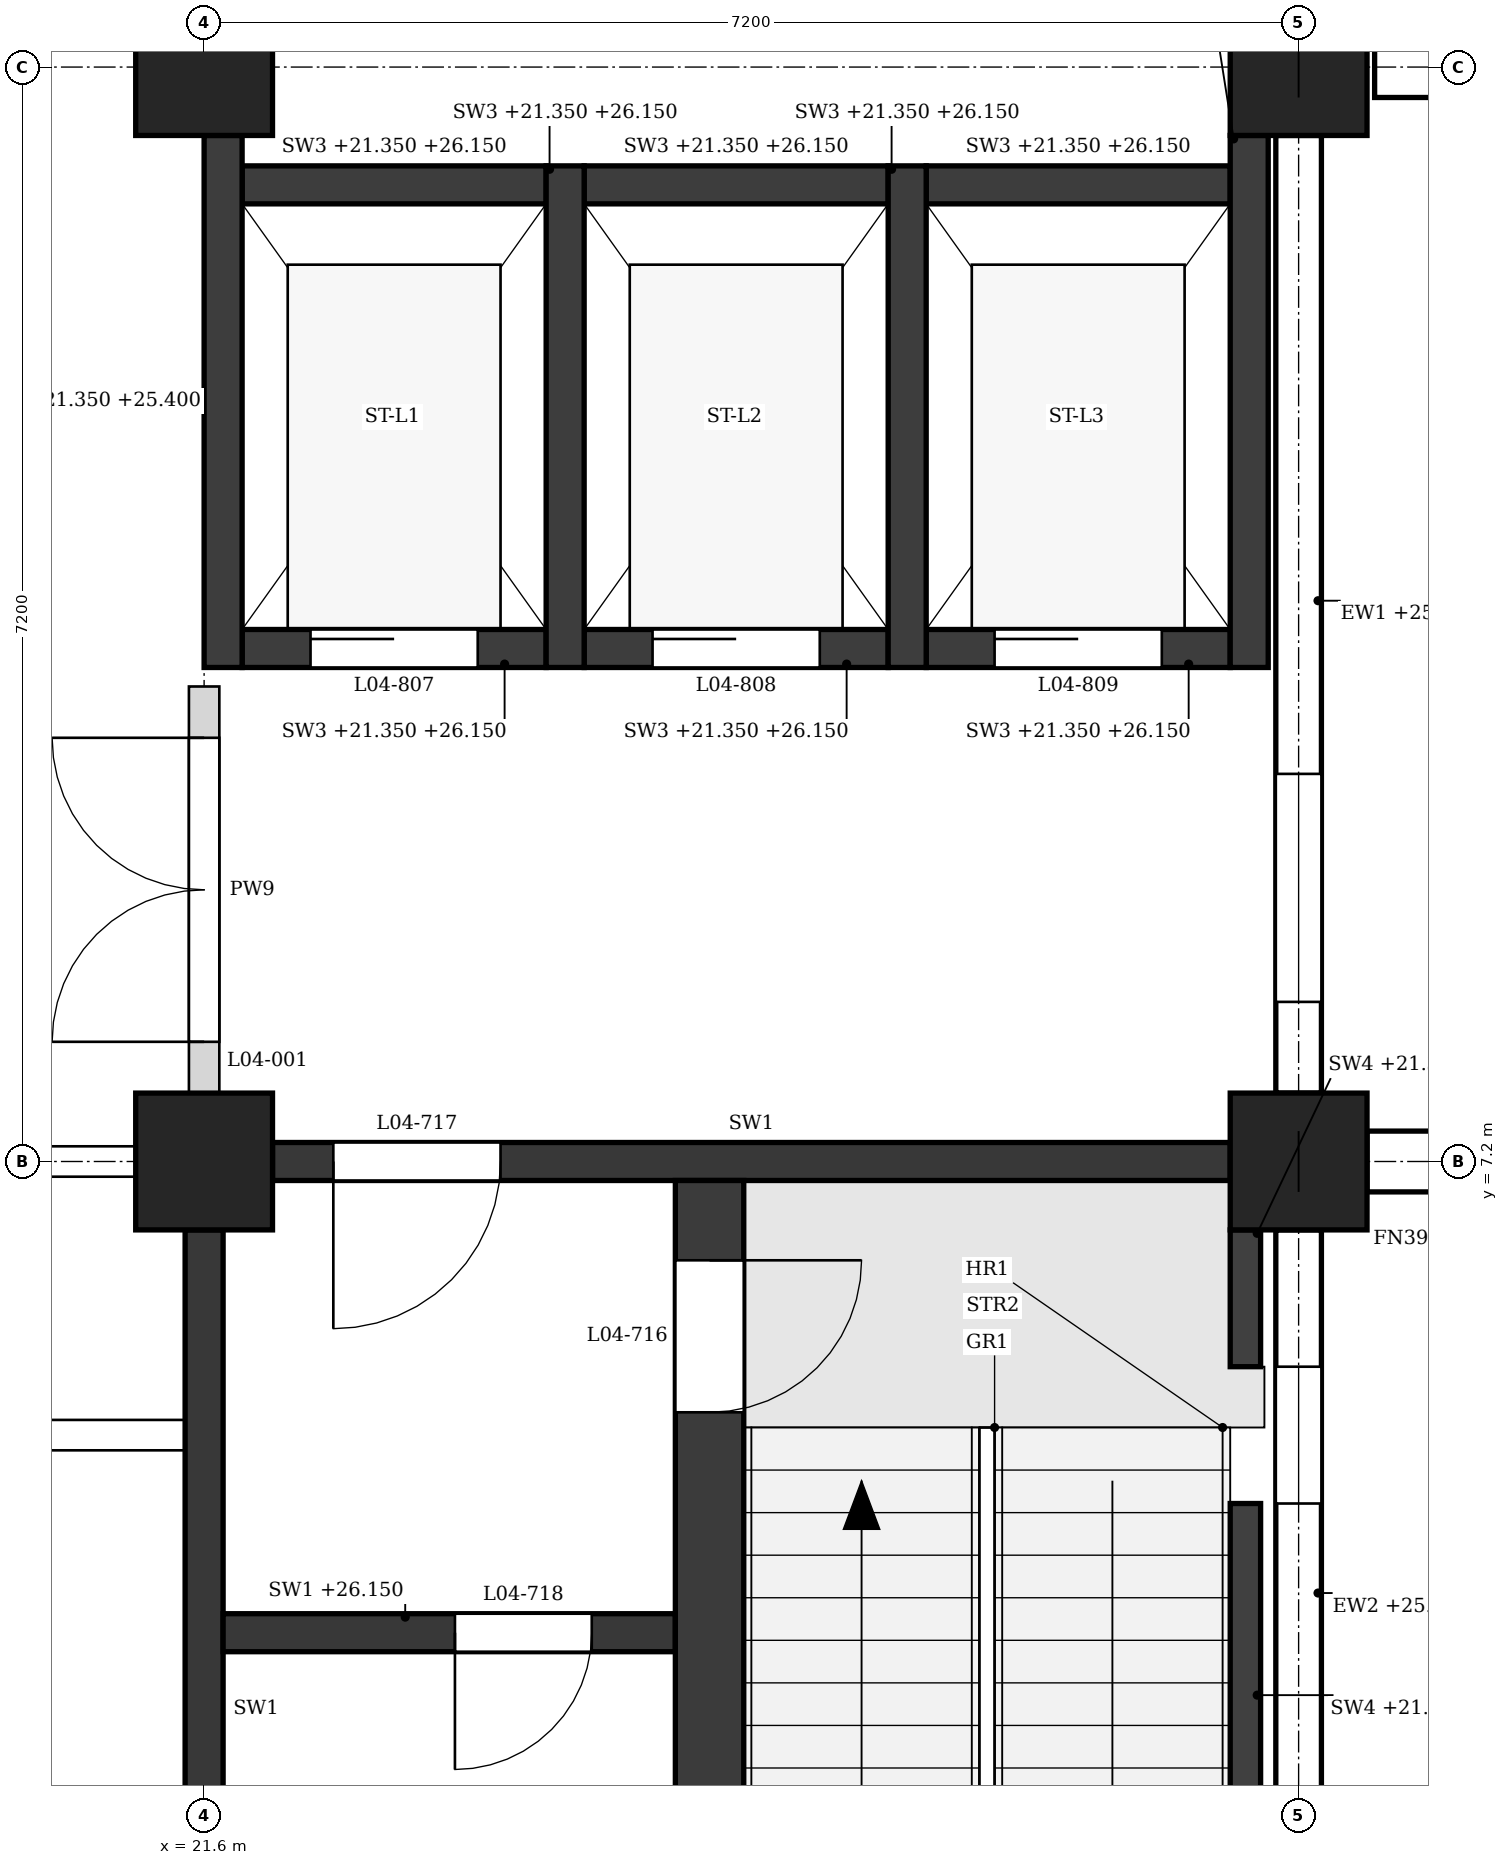
"""IFC4 building model, lengths in metres.
Left out: names, types, materials, properties, quantities, classifications, styles, units other than length and angle.
Written with IfcOpenShell. Run it as: python <this file> out.ifc"""

import sys

from ifc_helpers import new_model, si_unit, direction, frame, frame_2d, origin, origin_2d, place, context, subcontext, project, spatial, polyline, rectangle, outline, extrude, element, fill, save


model = new_model("IFC4")
c1 = context("Model", 3, precision=1e-05, world=origin(), true_north=direction((0.0, 1.0)))
c2 = subcontext(c1, "Body", "Model", "MODEL_VIEW")
j1 = project(units=[si_unit("LENGTHUNIT", "METRE"), si_unit("PLANEANGLEUNIT", "RADIAN")], contexts=[c1])
p1 = place(None, origin())
s1 = spatial("IfcSite", under=j1, at=p1, CompositionType="ELEMENT")
p2 = place(p1, origin())
s2 = spatial("IfcBuilding", under=s1, at=p2, CompositionType="ELEMENT")
p3 = place(p2, frame((0.0, 0.0, 21.6)))
s3 = spatial("IfcBuildingStorey", under=s2, at=p3, CompositionType="ELEMENT", Elevation=21.6)
for number, where, z_axis, x_axis in (
    (1, (21.6, 7.2, 0.0), (0.0, 0.0, 1.0), (1.0, 0.0, 0.0)),
    (2, (21.6, 14.4, 0.0), (0.0, 0.0, 1.0), (1.0, 0.0, 0.0)),
    (3, (28.8, 7.2, 0.0), (0.0, 0.0, 1.0), (1.0, 0.0, 0.0)),
    (4, (28.8, 14.4, 0.0), (0.0, 0.0, 1.0), (1.0, 0.0, 0.0)),
):
    element("IfcColumn", number, at=place(p3, frame(where, z_axis=z_axis, x_axis=x_axis)), inside=s3, PredefinedType="COLUMN", context=c2, shape_type="SweptSolid", body=[
        extrude(rectangle(XDim=0.9, YDim=0.9, at=origin_2d()), origin(), (0.0, 0.0, 1.0), 4.8),
    ])
p4 = place(p3, frame((28.8, 0.45, 0.0), z_axis=(0.0, 0.0, 1.0), x_axis=(0.0, 1.0, 0.0)))
e5 = element("IfcWall", 5, at=p4, inside=s3, PredefinedType="STANDARD", context=c2, shape_type="SweptSolid", body=[
    extrude(rectangle(XDim=6.3, YDim=0.3, at=frame_2d((3.15, 0.0))), origin(), (0.0, 0.0, 1.0), 3.95),
])
p5 = place(p4, frame((0.9, 0.0, 0.9)))
e6 = element("IfcOpeningElement", 6, at=p5, cuts=e5, PredefinedType="OPENING", context=c2, shape_type="SweptSolid", body=[
    extrude(outline(polyline([(0.0, 0.0), (0.9, 0.0), (0.9, 2.05), (0.45, 2.5), (0.0, 2.05), (0.0, 0.0)])), frame((0.0, 0.16, 0.0), z_axis=(0.0, -1.0, 0.0), x_axis=(1.0, 0.0, 0.0)), (0.0, 0.0, 1.0), 0.32),
])
p6 = place(p4, frame((4.5, 0.0, 0.9)))
e7 = element("IfcOpeningElement", 7, at=p6, cuts=e5, PredefinedType="OPENING", context=c2, shape_type="SweptSolid", body=[
    extrude(outline(polyline([(0.0, 0.0), (0.9, 0.0), (0.9, 2.05), (0.45, 2.5), (0.0, 2.05), (0.0, 0.0)])), frame((0.0, 0.16, 0.0), z_axis=(0.0, -1.0, 0.0), x_axis=(1.0, 0.0, 0.0)), (0.0, 0.0, 1.0), 0.32),
])
p7 = place(p3, frame((28.8, 7.65, 0.0), z_axis=(0.0, 0.0, 1.0), x_axis=(0.0, 1.0, 0.0)))
e8 = element("IfcWall", 8, at=p7, inside=s3, PredefinedType="STANDARD", context=c2, shape_type="SweptSolid", body=[
    extrude(rectangle(XDim=6.3, YDim=0.3, at=frame_2d((3.15, 0.0))), origin(), (0.0, 0.0, 1.0), 3.95),
])
p8 = place(p7, frame((0.6, 0.0, 0.9)))
e9 = element("IfcOpeningElement", 9, at=p8, cuts=e8, PredefinedType="OPENING", context=c2, shape_type="SweptSolid", body=[
    extrude(outline(polyline([(0.0, 0.0), (1.5, 0.0), (1.5, 1.75), (0.75, 2.5), (0.0, 1.75), (0.0, 0.0)])), frame((0.0, 0.16, 0.0), z_axis=(0.0, -1.0, 0.0), x_axis=(1.0, 0.0, 0.0)), (0.0, 0.0, 1.0), 0.32),
])
for number, where, z_axis, x_axis in (
    (10, (29.25, 7.2, -0.25), (0.0, 0.0, 1.0), (1.0, 0.0, 0.0)),
    (11, (29.3, 14.4, -0.25), (0.0, 0.0, 1.0), (1.0, 0.0, 0.0)),
):
    element("IfcWall", number, at=place(p3, frame(where, z_axis=z_axis, x_axis=x_axis)), inside=s3, PredefinedType="POLYGONAL", context=c2, shape_type="SweptSolid", body=[
        extrude(outline(polyline([(0.6, 0.0), (0.6, 19.125), (0.55, 19.2), (0.0, 19.2), (0.0, 0.0), (0.6, 0.0)])), frame((0.0, 0.2, 0.0), z_axis=(0.0, -1.0, 0.0), x_axis=(1.0, 0.0, 0.0)), (0.0, 0.0, 1.0), 0.4),
    ])
p9 = place(p3, frame((22.05, 7.2, 0.0), z_axis=(0.0, 0.0, 1.0), x_axis=(1.0, 0.0, 0.0)))
e12 = element("IfcWall", 12, at=p9, inside=s3, PredefinedType="SHEAR", context=c2, shape_type="SweptSolid", body=[
    extrude(rectangle(XDim=6.3, YDim=0.25, at=frame_2d((3.15, 0.0))), origin(), (0.0, 0.0, 1.0), 3.8),
])
p10 = place(p9, frame((0.4, 0.0, 0.0)))
e13 = element("IfcOpeningElement", 13, at=p10, cuts=e12, PredefinedType="OPENING", context=c2, shape_type="SweptSolid", body=[
    extrude(rectangle(XDim=1.1, YDim=2.1, at=frame_2d((0.55, 1.05))), frame((0.0, 0.135, 0.0), z_axis=(0.0, -1.0, 0.0), x_axis=(1.0, 0.0, 0.0)), (0.0, 0.0, 1.0), 0.27),
])
p11 = place(p3, frame((21.6, 0.45, 0.0), z_axis=(0.0, 0.0, 1.0), x_axis=(0.0, 1.0, 0.0)))
e14 = element("IfcWall", 14, at=p11, inside=s3, PredefinedType="SHEAR", context=c2, shape_type="SweptSolid", body=[
    extrude(rectangle(XDim=6.3, YDim=0.25, at=frame_2d((3.15, 0.0))), origin(), (0.0, 0.0, 1.0), 3.8),
])
p12 = place(p3, frame((28.45, 2.25, -0.25), z_axis=(0.0, 0.0, 1.0), x_axis=(0.0, 1.0, 0.0)))
e15 = element("IfcWall", 15, at=p12, inside=s3, PredefinedType="SHEAR", context=c2, shape_type="SweptSolid", body=[
    extrude(rectangle(XDim=2.7, YDim=0.2, at=frame_2d((1.35, 0.0))), origin(), (0.0, 0.0, 1.0), 4.8),
])
p13 = place(p3, frame((28.45, 5.85, -0.25), z_axis=(0.0, 0.0, 1.0), x_axis=(0.0, 1.0, 0.0)))
e16 = element("IfcWall", 16, at=p13, inside=s3, PredefinedType="SHEAR", context=c2, shape_type="SweptSolid", body=[
    extrude(rectangle(XDim=0.9, YDim=0.2, at=frame_2d((0.45, 0.0))), origin(), (0.0, 0.0, 1.0), 4.8),
])
p14 = place(p3, frame((24.925, 0.225, 0.0), z_axis=(0.0, 0.0, 1.0), x_axis=(0.0, 1.0, 0.0)))
e17 = element("IfcWall", 17, at=p14, inside=s3, PredefinedType="SHEAR", context=c2, shape_type="SweptSolid", body=[
    extrude(rectangle(XDim=6.85, YDim=0.45, at=frame_2d((3.425, 0.0))), origin(), (0.0, 0.0, 1.0), 4.55),
])
p15 = place(p14, frame((5.325, 0.0, 0.0)))
e18 = element("IfcOpeningElement", 18, at=p15, cuts=e17, PredefinedType="OPENING", context=c2, shape_type="SweptSolid", body=[
    extrude(rectangle(XDim=1.0, YDim=2.1, at=frame_2d((0.5, 1.05))), frame((0.0, 0.235, 0.0), z_axis=(0.0, -1.0, 0.0), x_axis=(1.0, 0.0, 0.0)), (0.0, 0.0, 1.0), 0.47),
])
p16 = place(p3, frame((21.725, 4.1, 0.0), z_axis=(0.0, 0.0, 1.0), x_axis=(1.0, 0.0, 0.0)))
e19 = element("IfcWall", 19, at=p16, inside=s3, PredefinedType="SHEAR", context=c2, shape_type="SweptSolid", body=[
    extrude(rectangle(XDim=2.975, YDim=0.25, at=frame_2d((1.487, 0.0))), origin(), (0.0, 0.0, 1.0), 4.55),
])
p17 = place(p16, frame((1.525, 0.0, 0.0)))
e20 = element("IfcOpeningElement", 20, at=p17, cuts=e19, PredefinedType="OPENING", context=c2, shape_type="SweptSolid", body=[
    extrude(rectangle(XDim=0.9, YDim=2.1, at=frame_2d((0.45, 1.05))), frame((0.0, 0.135, 0.0), z_axis=(0.0, -1.0, 0.0), x_axis=(1.0, 0.0, 0.0)), (0.0, 0.0, 1.0), 0.27),
])
p18 = place(p3, frame((21.725, 10.45, -0.25), z_axis=(0.0, 0.0, 1.0), x_axis=(0.0, 1.0, 0.0)))
e21 = element("IfcWall", 21, at=p18, inside=s3, PredefinedType="SHEAR", context=c2, shape_type="SweptSolid", body=[
    extrude(rectangle(XDim=3.5, YDim=0.25, at=frame_2d((1.75, 0.0))), origin(), (0.0, 0.0, 1.0), 4.05),
])
for number, where, z_axis, x_axis in (
    (22, (23.975, 10.45, -0.25), (0.0, 0.0, 1.0), (0.0, 1.0, 0.0)),
    (23, (26.225, 10.45, -0.25), (0.0, 0.0, 1.0), (0.0, 1.0, 0.0)),
):
    element("IfcWall", number, at=place(p3, frame(where, z_axis=z_axis, x_axis=x_axis)), inside=s3, PredefinedType="SHEAR", context=c2, shape_type="SweptSolid", body=[
        extrude(rectangle(XDim=3.3, YDim=0.25, at=frame_2d((1.65, 0.0))), origin(), (0.0, 0.0, 1.0), 4.8),
    ])
p19 = place(p3, frame((28.475, 10.45, -0.25), z_axis=(0.0, 0.0, 1.0), x_axis=(0.0, 1.0, 0.0)))
e24 = element("IfcWall", 24, at=p19, inside=s3, PredefinedType="SHEAR", context=c2, shape_type="SweptSolid", body=[
    extrude(rectangle(XDim=3.5, YDim=0.25, at=frame_2d((1.75, 0.0))), origin(), (0.0, 0.0, 1.0), 4.8),
])
p20 = place(p3, frame((21.85, 10.575, -0.25), z_axis=(0.0, 0.0, 1.0), x_axis=(1.0, 0.0, 0.0)))
e25 = element("IfcWall", 25, at=p20, inside=s3, PredefinedType="SHEAR", context=c2, shape_type="SweptSolid", body=[
    extrude(rectangle(XDim=2.0, YDim=0.25, at=frame_2d((1.0, 0.0))), origin(), (0.0, 0.0, 1.0), 4.8),
])
p21 = place(p20, frame((0.45, 0.0, 0.25)))
e26 = element("IfcOpeningElement", 26, at=p21, cuts=e25, PredefinedType="OPENING", context=c2, shape_type="SweptSolid", body=[
    extrude(rectangle(XDim=1.1, YDim=2.1, at=frame_2d((0.55, 1.05))), frame((0.0, 0.135, 0.0), z_axis=(0.0, -1.0, 0.0), x_axis=(1.0, 0.0, 0.0)), (0.0, 0.0, 1.0), 0.27),
])
p22 = place(p3, frame((21.85, 13.625, -0.25), z_axis=(0.0, 0.0, 1.0), x_axis=(1.0, 0.0, 0.0)))
e27 = element("IfcWall", 27, at=p22, inside=s3, PredefinedType="SHEAR", context=c2, shape_type="SweptSolid", body=[
    extrude(rectangle(XDim=2.0, YDim=0.25, at=frame_2d((1.0, 0.0))), origin(), (0.0, 0.0, 1.0), 4.8),
])
p23 = place(p3, frame((24.1, 10.575, -0.25), z_axis=(0.0, 0.0, 1.0), x_axis=(1.0, 0.0, 0.0)))
e28 = element("IfcWall", 28, at=p23, inside=s3, PredefinedType="SHEAR", context=c2, shape_type="SweptSolid", body=[
    extrude(rectangle(XDim=2.0, YDim=0.25, at=frame_2d((1.0, 0.0))), origin(), (0.0, 0.0, 1.0), 4.8),
])
p24 = place(p23, frame((0.45, 0.0, 0.25)))
e29 = element("IfcOpeningElement", 29, at=p24, cuts=e28, PredefinedType="OPENING", context=c2, shape_type="SweptSolid", body=[
    extrude(rectangle(XDim=1.1, YDim=2.1, at=frame_2d((0.55, 1.05))), frame((0.0, 0.135, 0.0), z_axis=(0.0, -1.0, 0.0), x_axis=(1.0, 0.0, 0.0)), (0.0, 0.0, 1.0), 0.27),
])
p25 = place(p3, frame((24.1, 13.625, -0.25), z_axis=(0.0, 0.0, 1.0), x_axis=(1.0, 0.0, 0.0)))
e30 = element("IfcWall", 30, at=p25, inside=s3, PredefinedType="SHEAR", context=c2, shape_type="SweptSolid", body=[
    extrude(rectangle(XDim=2.0, YDim=0.25, at=frame_2d((1.0, 0.0))), origin(), (0.0, 0.0, 1.0), 4.8),
])
p26 = place(p3, frame((26.35, 10.575, -0.25), z_axis=(0.0, 0.0, 1.0), x_axis=(1.0, 0.0, 0.0)))
e31 = element("IfcWall", 31, at=p26, inside=s3, PredefinedType="SHEAR", context=c2, shape_type="SweptSolid", body=[
    extrude(rectangle(XDim=2.0, YDim=0.25, at=frame_2d((1.0, 0.0))), origin(), (0.0, 0.0, 1.0), 4.8),
])
p27 = place(p26, frame((0.45, 0.0, 0.25)))
e32 = element("IfcOpeningElement", 32, at=p27, cuts=e31, PredefinedType="OPENING", context=c2, shape_type="SweptSolid", body=[
    extrude(rectangle(XDim=1.1, YDim=2.1, at=frame_2d((0.55, 1.05))), frame((0.0, 0.135, 0.0), z_axis=(0.0, -1.0, 0.0), x_axis=(1.0, 0.0, 0.0)), (0.0, 0.0, 1.0), 0.27),
])
p28 = place(p3, frame((26.35, 13.625, -0.25), z_axis=(0.0, 0.0, 1.0), x_axis=(1.0, 0.0, 0.0)))
e33 = element("IfcWall", 33, at=p28, inside=s3, PredefinedType="SHEAR", context=c2, shape_type="SweptSolid", body=[
    extrude(rectangle(XDim=2.0, YDim=0.25, at=frame_2d((1.0, 0.0))), origin(), (0.0, 0.0, 1.0), 4.8),
])
p29 = place(p3, frame((7.325, 5.4, 0.0), z_axis=(0.0, 0.0, 1.0), x_axis=(1.0, 0.0, 0.0)))
e34 = element("IfcWall", 34, at=p29, inside=s3, PredefinedType="PARTITIONING", context=c2, shape_type="SweptSolid", body=[
    extrude(outline(polyline([(0.0, 0.0), (14.15, 0.0), (14.15, 3.8), (14.025, 3.8), (14.025, 4.55), (7.325, 4.55), (7.325, 3.8), (6.825, 3.8), (6.825, 4.55), (0.125, 4.55), (0.125, 3.8), (0.0, 3.8), (0.0, 0.0)])), frame((0.0, 0.1, 0.0), z_axis=(0.0, -1.0, 0.0), x_axis=(1.0, 0.0, 0.0)), (0.0, 0.0, 1.0), 0.2),
])
p30 = place(p29, frame((1.238, 0.0, 0.0)))
e35 = element("IfcOpeningElement", 35, at=p30, cuts=e34, PredefinedType="OPENING", context=c2, shape_type="SweptSolid", body=[
    extrude(rectangle(XDim=1.0, YDim=2.1, at=frame_2d((0.5, 1.05))), frame((0.0, 0.11, 0.0), z_axis=(0.0, -1.0, 0.0), x_axis=(1.0, 0.0, 0.0)), (0.0, 0.0, 1.0), 0.22),
])
p31 = place(p29, frame((4.775, 0.0, 0.0)))
e36 = element("IfcOpeningElement", 36, at=p31, cuts=e34, PredefinedType="OPENING", context=c2, shape_type="SweptSolid", body=[
    extrude(rectangle(XDim=1.0, YDim=2.1, at=frame_2d((0.5, 1.05))), frame((0.0, 0.11, 0.0), z_axis=(0.0, -1.0, 0.0), x_axis=(1.0, 0.0, 0.0)), (0.0, 0.0, 1.0), 0.22),
])
p32 = place(p29, frame((8.375, 0.0, 0.0)))
e37 = element("IfcOpeningElement", 37, at=p32, cuts=e34, PredefinedType="OPENING", context=c2, shape_type="SweptSolid", body=[
    extrude(rectangle(XDim=1.0, YDim=2.1, at=frame_2d((0.5, 1.05))), frame((0.0, 0.11, 0.0), z_axis=(0.0, -1.0, 0.0), x_axis=(1.0, 0.0, 0.0)), (0.0, 0.0, 1.0), 0.22),
])
p33 = place(p29, frame((11.913, 0.0, 0.0)))
e38 = element("IfcOpeningElement", 38, at=p33, cuts=e34, PredefinedType="OPENING", context=c2, shape_type="SweptSolid", body=[
    extrude(rectangle(XDim=1.0, YDim=2.1, at=frame_2d((0.5, 1.05))), frame((0.0, 0.11, 0.0), z_axis=(0.0, -1.0, 0.0), x_axis=(1.0, 0.0, 0.0)), (0.0, 0.0, 1.0), 0.22),
])
p34 = place(p3, frame((14.85, 7.2, 0.0), z_axis=(0.0, 0.0, 1.0), x_axis=(1.0, 0.0, 0.0)))
e39 = element("IfcWall", 39, at=p34, inside=s3, PredefinedType="PARTITIONING", context=c2, shape_type="SweptSolid", body=[
    extrude(rectangle(XDim=6.3, YDim=0.2, at=frame_2d((3.15, 0.0))), origin(), (0.0, 0.0, 1.0), 3.8),
])
p35 = place(p34, frame((4.225, 0.0, 0.0)))
e40 = element("IfcOpeningElement", 40, at=p35, cuts=e39, PredefinedType="OPENING", context=c2, shape_type="SweptSolid", body=[
    extrude(rectangle(XDim=1.0, YDim=2.1, at=frame_2d((0.5, 1.05))), frame((0.0, 0.11, 0.0), z_axis=(0.0, -1.0, 0.0), x_axis=(1.0, 0.0, 0.0)), (0.0, 0.0, 1.0), 0.22),
])
p36 = place(p3, frame((21.6, 7.65, 0.0), z_axis=(0.0, 0.0, 1.0), x_axis=(0.0, 1.0, 0.0)))
e41 = element("IfcWall", 41, at=p36, inside=s3, PredefinedType="PARTITIONING", context=c2, shape_type="SweptSolid", body=[
    extrude(rectangle(XDim=2.675, YDim=0.2, at=frame_2d((1.337, 0.0))), origin(), (0.0, 0.0, 1.0), 3.8),
])
p37 = place(p36, frame((0.337, 0.0, 0.0)))
e42 = element("IfcOpeningElement", 42, at=p37, cuts=e41, PredefinedType="OPENING", context=c2, shape_type="SweptSolid", body=[
    extrude(rectangle(XDim=2.0, YDim=2.4, at=frame_2d((1.0, 1.2))), frame((0.0, 0.11, 0.0), z_axis=(0.0, -1.0, 0.0), x_axis=(1.0, 0.0, 0.0)), (0.0, 0.0, 1.0), 0.22),
])
p38 = place(p6, origin())
e43 = element("IfcWindow", 43, at=p38, inside=s3, PartitioningType="SINGLE_PANEL", PredefinedType="WINDOW", context=c2, shape_type="SweptSolid", body=[
    extrude(outline(polyline([(0.0, 0.0), (0.9, 0.0), (0.9, 2.05), (0.45, 2.5), (0.0, 2.05), (0.0, 0.0)])), frame((0.0, 0.03, 0.0), z_axis=(0.0, -1.0, 0.0), x_axis=(1.0, 0.0, 0.0)), (0.0, 0.0, 1.0), 0.06),
])
fill(e7, e43)
p39 = place(p8, origin())
e44 = element("IfcWindow", 44, at=p39, inside=s3, PartitioningType="SINGLE_PANEL", PredefinedType="WINDOW", context=c2, shape_type="SweptSolid", body=[
    extrude(outline(polyline([(0.0, 0.0), (1.5, 0.0), (1.5, 1.75), (0.75, 2.5), (0.0, 1.75), (0.0, 0.0)])), frame((0.0, 0.03, 0.0), z_axis=(0.0, -1.0, 0.0), x_axis=(1.0, 0.0, 0.0)), (0.0, 0.0, 1.0), 0.06),
])
fill(e9, e44)
p40 = place(p15, frame((1.0, 0.0, 0.0), z_axis=(0.0, 0.0, 1.0), x_axis=(-1.0, 0.0, 0.0)))
e45 = element("IfcDoor", 45, at=p40, inside=s3, OperationType="SINGLE_SWING_LEFT", PredefinedType="DOOR", context=c2, shape_type="SweptSolid", body=[
    extrude(rectangle(XDim=1.0, YDim=2.1, at=frame_2d((0.5, 1.05))), frame((0.0, 0.025, 0.0), z_axis=(0.0, -1.0, 0.0), x_axis=(1.0, 0.0, 0.0)), (0.0, 0.0, 1.0), 0.05),
])
fill(e18, e45)
p41 = place(p10, frame((1.1, 0.0, 0.0), z_axis=(0.0, 0.0, 1.0), x_axis=(-1.0, 0.0, 0.0)))
e46 = element("IfcDoor", 46, at=p41, inside=s3, OperationType="SINGLE_SWING_RIGHT", PredefinedType="DOOR", context=c2, shape_type="SweptSolid", body=[
    extrude(rectangle(XDim=1.1, YDim=2.1, at=frame_2d((0.55, 1.05))), frame((0.0, 0.025, 0.0), z_axis=(0.0, -1.0, 0.0), x_axis=(1.0, 0.0, 0.0)), (0.0, 0.0, 1.0), 0.05),
])
fill(e13, e46)
p42 = place(p17, frame((0.9, 0.0, 0.0), z_axis=(0.0, 0.0, 1.0), x_axis=(-1.0, 0.0, 0.0)))
e47 = element("IfcDoor", 47, at=p42, inside=s3, OperationType="SINGLE_SWING_RIGHT", PredefinedType="DOOR", context=c2, shape_type="SweptSolid", body=[
    extrude(rectangle(XDim=0.9, YDim=2.1, at=frame_2d((0.45, 1.05))), frame((0.0, 0.025, 0.0), z_axis=(0.0, -1.0, 0.0), x_axis=(1.0, 0.0, 0.0)), (0.0, 0.0, 1.0), 0.05),
])
fill(e20, e47)
p43 = place(p21, origin())
e48 = element("IfcDoor", 48, at=p43, inside=s3, OperationType="SLIDING_TO_LEFT", PredefinedType="DOOR", context=c2, shape_type="SweptSolid", body=[
    extrude(rectangle(XDim=1.1, YDim=2.1, at=frame_2d((0.55, 1.05))), frame((0.0, 0.025, 0.0), z_axis=(0.0, -1.0, 0.0), x_axis=(1.0, 0.0, 0.0)), (0.0, 0.0, 1.0), 0.05),
])
fill(e26, e48)
p44 = place(p24, origin())
e49 = element("IfcDoor", 49, at=p44, inside=s3, OperationType="SLIDING_TO_LEFT", PredefinedType="DOOR", context=c2, shape_type="SweptSolid", body=[
    extrude(rectangle(XDim=1.1, YDim=2.1, at=frame_2d((0.55, 1.05))), frame((0.0, 0.025, 0.0), z_axis=(0.0, -1.0, 0.0), x_axis=(1.0, 0.0, 0.0)), (0.0, 0.0, 1.0), 0.05),
])
fill(e29, e49)
p45 = place(p27, origin())
e50 = element("IfcDoor", 50, at=p45, inside=s3, OperationType="SLIDING_TO_LEFT", PredefinedType="DOOR", context=c2, shape_type="SweptSolid", body=[
    extrude(rectangle(XDim=1.1, YDim=2.1, at=frame_2d((0.55, 1.05))), frame((0.0, 0.025, 0.0), z_axis=(0.0, -1.0, 0.0), x_axis=(1.0, 0.0, 0.0)), (0.0, 0.0, 1.0), 0.05),
])
fill(e32, e50)
p46 = place(p37, origin())
e51 = element("IfcDoor", 51, at=p46, inside=s3, OperationType="DOUBLE_DOOR_SINGLE_SWING", PredefinedType="DOOR", context=c2, shape_type="SweptSolid", body=[
    extrude(rectangle(XDim=2.0, YDim=2.4, at=frame_2d((1.0, 1.2))), frame((0.0, 0.025, 0.0), z_axis=(0.0, -1.0, 0.0), x_axis=(1.0, 0.0, 0.0)), (0.0, 0.0, 1.0), 0.05),
])
fill(e42, e51)
save(model, sys.argv[1])
